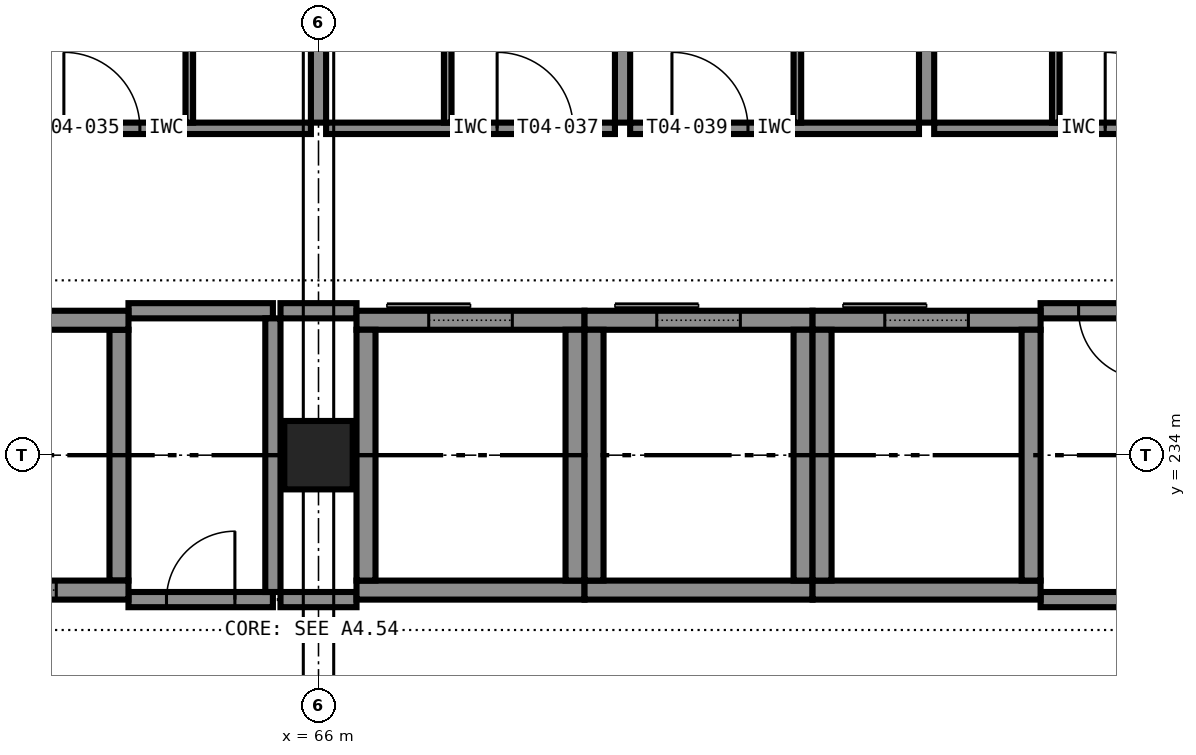
"""IFC4 building model, lengths in metres.
Left out: names, types, materials, properties, quantities, classifications, styles, units other than length and angle.
Written with IfcOpenShell. Run it as: python <this file> out.ifc"""

import sys

from ifc_helpers import new_model, si_unit, direction, frame, frame_2d, origin, origin_2d, place, context, subcontext, project, spatial, rectangle, extrude, element, fill, save


model = new_model("IFC4")
c1 = context("Model", 3, precision=1e-05, world=origin(), true_north=direction((0.0, 1.0)))
c2 = subcontext(c1, "Body", "Model", "MODEL_VIEW")
j1 = project(units=[si_unit("LENGTHUNIT", "METRE"), si_unit("PLANEANGLEUNIT", "RADIAN")], contexts=[c1])
p1 = place(None, origin())
s1 = spatial("IfcSite", under=j1, at=p1, CompositionType="ELEMENT")
p2 = place(p1, origin())
s2 = spatial("IfcBuilding", under=s1, at=p2, CompositionType="ELEMENT")
p3 = place(p2, frame((0.0, 0.0, 24.6)))
s3 = spatial("IfcBuildingStorey", under=s2, at=p3, CompositionType="ELEMENT", Elevation=24.6)
p4 = place(p3, frame((66.0, 234.0, 0.0), z_axis=(0.0, 0.0, 1.0), x_axis=(1.0, 0.0, 0.0)))
e1 = element("IfcColumn", 1, at=p4, inside=s3, PredefinedType="COLUMN", context=c2, shape_type="SweptSolid", body=[
    extrude(rectangle(XDim=0.9, YDim=0.9, at=origin_2d()), origin(), (0.0, 0.0, 1.0), 3.6),
])
p5 = place(p3, frame((60.5, 232.225, 0.0), z_axis=(0.0, 0.0, 1.0), x_axis=(1.0, 0.0, 0.0)))
e2 = element("IfcWall", 2, at=p5, inside=s3, PredefinedType="SHEAR", context=c2, shape_type="SweptSolid", body=[
    extrude(rectangle(XDim=3.0, YDim=0.25, at=frame_2d((1.5, 0.0))), origin(), (0.0, 0.0, 1.0), 3.6),
])
p6 = place(p5, frame((0.95, 0.0, 0.0)))
e3 = element("IfcOpeningElement", 3, at=p6, cuts=e2, PredefinedType="OPENING", context=c2, shape_type="SweptSolid", body=[
    extrude(rectangle(XDim=1.1, YDim=2.1, at=frame_2d((0.55, 1.05))), frame((0.0, 0.135, 0.0), z_axis=(0.0, -1.0, 0.0), x_axis=(1.0, 0.0, 0.0)), (0.0, 0.0, 1.0), 0.27),
])
p7 = place(p3, frame((60.5, 235.775, 0.0), z_axis=(0.0, 0.0, 1.0), x_axis=(1.0, 0.0, 0.0)))
e4 = element("IfcWall", 4, at=p7, inside=s3, PredefinedType="SHEAR", context=c2, shape_type="SweptSolid", body=[
    extrude(rectangle(XDim=3.0, YDim=0.25, at=frame_2d((1.5, 0.0))), origin(), (0.0, 0.0, 1.0), 3.6),
])
p8 = place(p3, frame((63.375, 232.35, 0.0), z_axis=(0.0, 0.0, 1.0), x_axis=(0.0, 1.0, 0.0)))
e5 = element("IfcWall", 5, at=p8, inside=s3, PredefinedType="SHEAR", context=c2, shape_type="SweptSolid", body=[
    extrude(rectangle(XDim=3.3, YDim=0.25, at=frame_2d((1.65, 0.0))), origin(), (0.0, 0.0, 1.0), 3.6),
])
p9 = place(p3, frame((66.5, 232.225, 0.0), z_axis=(0.0, 0.0, 1.0), x_axis=(1.0, 0.0, 0.0)))
e6 = element("IfcWall", 6, at=p9, inside=s3, PredefinedType="SHEAR", context=c2, shape_type="SweptSolid", body=[
    extrude(rectangle(XDim=3.0, YDim=0.25, at=frame_2d((1.5, 0.0))), origin(), (0.0, 0.0, 1.0), 3.6),
])
p10 = place(p3, frame((66.5, 235.775, 0.0), z_axis=(0.0, 0.0, 1.0), x_axis=(1.0, 0.0, 0.0)))
e7 = element("IfcWall", 7, at=p10, inside=s3, PredefinedType="SHEAR", context=c2, shape_type="SweptSolid", body=[
    extrude(rectangle(XDim=3.0, YDim=0.25, at=frame_2d((1.5, 0.0))), origin(), (0.0, 0.0, 1.0), 3.6),
])
p11 = place(p10, frame((0.95, 0.0, 0.0)))
e8 = element("IfcOpeningElement", 8, at=p11, cuts=e7, PredefinedType="OPENING", context=c2, shape_type="SweptSolid", body=[
    extrude(rectangle(XDim=1.1, YDim=2.1, at=frame_2d((0.55, 1.05))), frame((0.0, 0.135, 0.0), z_axis=(0.0, -1.0, 0.0), x_axis=(1.0, 0.0, 0.0)), (0.0, 0.0, 1.0), 0.27),
])
for number, where, z_axis, x_axis in (
    (9, (66.625, 232.35, 0.0), (0.0, 0.0, 1.0), (0.0, 1.0, 0.0)),
    (10, (69.375, 232.35, 0.0), (0.0, 0.0, 1.0), (0.0, 1.0, 0.0)),
):
    element("IfcWall", number, at=place(p3, frame(where, z_axis=z_axis, x_axis=x_axis)), inside=s3, PredefinedType="SHEAR", context=c2, shape_type="SweptSolid", body=[
        extrude(rectangle(XDim=3.3, YDim=0.25, at=frame_2d((1.65, 0.0))), origin(), (0.0, 0.0, 1.0), 3.6),
    ])
p12 = place(p3, frame((69.5, 232.225, 0.0), z_axis=(0.0, 0.0, 1.0), x_axis=(1.0, 0.0, 0.0)))
e11 = element("IfcWall", 11, at=p12, inside=s3, PredefinedType="SHEAR", context=c2, shape_type="SweptSolid", body=[
    extrude(rectangle(XDim=3.0, YDim=0.25, at=frame_2d((1.5, 0.0))), origin(), (0.0, 0.0, 1.0), 3.6),
])
p13 = place(p3, frame((69.5, 235.775, 0.0), z_axis=(0.0, 0.0, 1.0), x_axis=(1.0, 0.0, 0.0)))
e12 = element("IfcWall", 12, at=p13, inside=s3, PredefinedType="SHEAR", context=c2, shape_type="SweptSolid", body=[
    extrude(rectangle(XDim=3.0, YDim=0.25, at=frame_2d((1.5, 0.0))), origin(), (0.0, 0.0, 1.0), 3.6),
])
p14 = place(p13, frame((0.95, 0.0, 0.0)))
e13 = element("IfcOpeningElement", 13, at=p14, cuts=e12, PredefinedType="OPENING", context=c2, shape_type="SweptSolid", body=[
    extrude(rectangle(XDim=1.1, YDim=2.1, at=frame_2d((0.55, 1.05))), frame((0.0, 0.135, 0.0), z_axis=(0.0, -1.0, 0.0), x_axis=(1.0, 0.0, 0.0)), (0.0, 0.0, 1.0), 0.27),
])
for number, where, z_axis, x_axis in (
    (14, (69.625, 232.35, 0.0), (0.0, 0.0, 1.0), (0.0, 1.0, 0.0)),
    (15, (72.375, 232.35, 0.0), (0.0, 0.0, 1.0), (0.0, 1.0, 0.0)),
):
    element("IfcWall", number, at=place(p3, frame(where, z_axis=z_axis, x_axis=x_axis)), inside=s3, PredefinedType="SHEAR", context=c2, shape_type="SweptSolid", body=[
        extrude(rectangle(XDim=3.3, YDim=0.25, at=frame_2d((1.65, 0.0))), origin(), (0.0, 0.0, 1.0), 3.6),
    ])
p15 = place(p3, frame((72.5, 232.225, 0.0), z_axis=(0.0, 0.0, 1.0), x_axis=(1.0, 0.0, 0.0)))
e16 = element("IfcWall", 16, at=p15, inside=s3, PredefinedType="SHEAR", context=c2, shape_type="SweptSolid", body=[
    extrude(rectangle(XDim=3.0, YDim=0.25, at=frame_2d((1.5, 0.0))), origin(), (0.0, 0.0, 1.0), 3.6),
])
p16 = place(p3, frame((72.5, 235.775, 0.0), z_axis=(0.0, 0.0, 1.0), x_axis=(1.0, 0.0, 0.0)))
e17 = element("IfcWall", 17, at=p16, inside=s3, PredefinedType="SHEAR", context=c2, shape_type="SweptSolid", body=[
    extrude(rectangle(XDim=3.0, YDim=0.25, at=frame_2d((1.5, 0.0))), origin(), (0.0, 0.0, 1.0), 3.6),
])
p17 = place(p16, frame((0.95, 0.0, 0.0)))
e18 = element("IfcOpeningElement", 18, at=p17, cuts=e17, PredefinedType="OPENING", context=c2, shape_type="SweptSolid", body=[
    extrude(rectangle(XDim=1.1, YDim=2.1, at=frame_2d((0.55, 1.05))), frame((0.0, 0.135, 0.0), z_axis=(0.0, -1.0, 0.0), x_axis=(1.0, 0.0, 0.0)), (0.0, 0.0, 1.0), 0.27),
])
for number, where, z_axis, x_axis in (
    (19, (72.625, 232.35, 0.0), (0.0, 0.0, 1.0), (0.0, 1.0, 0.0)),
    (20, (75.375, 232.35, 0.0), (0.0, 0.0, 1.0), (0.0, 1.0, 0.0)),
):
    element("IfcWall", number, at=place(p3, frame(where, z_axis=z_axis, x_axis=x_axis)), inside=s3, PredefinedType="SHEAR", context=c2, shape_type="SweptSolid", body=[
        extrude(rectangle(XDim=3.3, YDim=0.25, at=frame_2d((1.65, 0.0))), origin(), (0.0, 0.0, 1.0), 3.6),
    ])
p18 = place(p3, frame((63.5, 232.1, 0.0), z_axis=(0.0, 0.0, 1.0), x_axis=(1.0, 0.0, 0.0)))
e21 = element("IfcWall", 21, at=p18, inside=s3, PredefinedType="PARTITIONING", context=c2, shape_type="SweptSolid", body=[
    extrude(rectangle(XDim=1.9, YDim=0.2, at=frame_2d((0.95, 0.0))), origin(), (0.0, 0.0, 1.0), 3.4),
])
p19 = place(p18, frame((0.5, 0.0, 0.0)))
e22 = element("IfcOpeningElement", 22, at=p19, cuts=e21, PredefinedType="OPENING", context=c2, shape_type="SweptSolid", body=[
    extrude(rectangle(XDim=0.9, YDim=2.1, at=frame_2d((0.45, 1.05))), frame((0.0, 0.11, 0.0), z_axis=(0.0, -1.0, 0.0), x_axis=(1.0, 0.0, 0.0)), (0.0, 0.0, 1.0), 0.22),
])
p20 = place(p3, frame((65.5, 232.1, 0.0), z_axis=(0.0, 0.0, 1.0), x_axis=(1.0, 0.0, 0.0)))
e23 = element("IfcWall", 23, at=p20, inside=s3, PredefinedType="PARTITIONING", context=c2, shape_type="SweptSolid", body=[
    extrude(rectangle(XDim=1.0, YDim=0.2, at=frame_2d((0.5, 0.0))), origin(), (0.0, 0.0, 1.0), 3.4),
])
for number, where, z_axis, x_axis in (
    (24, (75.5, 232.1, 0.0), (0.0, 0.0, 1.0), (1.0, 0.0, 0.0)),
    (25, (63.5, 235.9, 0.0), (0.0, 0.0, 1.0), (1.0, 0.0, 0.0)),
):
    element("IfcWall", number, at=place(p3, frame(where, z_axis=z_axis, x_axis=x_axis)), inside=s3, PredefinedType="PARTITIONING", context=c2, shape_type="SweptSolid", body=[
        extrude(rectangle(XDim=1.9, YDim=0.2, at=frame_2d((0.95, 0.0))), origin(), (0.0, 0.0, 1.0), 3.4),
    ])
p21 = place(p3, frame((65.5, 235.9, 0.0), z_axis=(0.0, 0.0, 1.0), x_axis=(1.0, 0.0, 0.0)))
e26 = element("IfcWall", 26, at=p21, inside=s3, PredefinedType="PARTITIONING", context=c2, shape_type="SweptSolid", body=[
    extrude(rectangle(XDim=1.0, YDim=0.2, at=frame_2d((0.5, 0.0))), origin(), (0.0, 0.0, 1.0), 3.4),
])
p22 = place(p3, frame((77.4, 235.9, 0.0), z_axis=(0.0, 0.0, 1.0), x_axis=(-1.0, 0.0, 0.0)))
e27 = element("IfcWall", 27, at=p22, inside=s3, PredefinedType="PARTITIONING", context=c2, shape_type="SweptSolid", body=[
    extrude(rectangle(XDim=1.9, YDim=0.2, at=frame_2d((0.95, 0.0))), origin(), (0.0, 0.0, 1.0), 3.4),
])
p23 = place(p22, frame((0.5, 0.0, 0.0)))
e28 = element("IfcOpeningElement", 28, at=p23, cuts=e27, PredefinedType="OPENING", context=c2, shape_type="SweptSolid", body=[
    extrude(rectangle(XDim=0.9, YDim=2.1, at=frame_2d((0.45, 1.05))), frame((0.0, 0.11, 0.0), z_axis=(0.0, -1.0, 0.0), x_axis=(1.0, 0.0, 0.0)), (0.0, 0.0, 1.0), 0.22),
])
p24 = place(p3, frame((65.4, 232.2, 0.0), z_axis=(0.0, 0.0, 1.0), x_axis=(0.0, 1.0, 0.0)))
e29 = element("IfcWall", 29, at=p24, inside=s3, PredefinedType="PARTITIONING", context=c2, shape_type="SweptSolid", body=[
    extrude(rectangle(XDim=3.6, YDim=0.2, at=frame_2d((1.8, 0.0))), origin(), (0.0, 0.0, 1.0), 3.4),
])
p25 = place(p3, frame((62.1, 238.3, 0.0), z_axis=(0.0, 0.0, 1.0), x_axis=(1.0, 0.0, 0.0)))
e30 = element("IfcWall", 30, at=p25, inside=s3, PredefinedType="PARTITIONING", context=c2, shape_type="SweptSolid", body=[
    extrude(rectangle(XDim=3.8, YDim=0.15, at=frame_2d((1.9, 0.0))), origin(), (0.0, 0.0, 1.0), 3.4),
])
p26 = place(p25, frame((0.55, 0.0, 0.0)))
e31 = element("IfcOpeningElement", 31, at=p26, cuts=e30, PredefinedType="OPENING", context=c2, shape_type="SweptSolid", body=[
    extrude(rectangle(XDim=1.0, YDim=2.1, at=frame_2d((0.5, 1.05))), frame((0.0, 0.085, 0.0), z_axis=(0.0, -1.0, 0.0), x_axis=(1.0, 0.0, 0.0)), (0.0, 0.0, 1.0), 0.17),
])
p27 = place(p3, frame((64.3, 238.375, 0.0), z_axis=(0.0, 0.0, 1.0), x_axis=(0.0, 1.0, 0.0)))
e32 = element("IfcWall", 32, at=p27, inside=s3, PredefinedType="PARTITIONING", context=c2, shape_type="SweptSolid", body=[
    extrude(rectangle(XDim=2.875, YDim=0.1, at=frame_2d((1.438, 0.0))), origin(), (0.0, 0.0, 1.0), 3.4),
])
p28 = place(p27, frame((1.038, 0.0, 0.0)))
e33 = element("IfcOpeningElement", 33, at=p28, cuts=e32, PredefinedType="OPENING", context=c2, shape_type="SweptSolid", body=[
    extrude(rectangle(XDim=0.8, YDim=2.1, at=frame_2d((0.4, 1.05))), frame((0.0, 0.06, 0.0), z_axis=(0.0, -1.0, 0.0), x_axis=(1.0, 0.0, 0.0)), (0.0, 0.0, 1.0), 0.12),
])
p29 = place(p3, frame((66.1, 238.3, 0.0), z_axis=(0.0, 0.0, 1.0), x_axis=(1.0, 0.0, 0.0)))
e34 = element("IfcWall", 34, at=p29, inside=s3, PredefinedType="PARTITIONING", context=c2, shape_type="SweptSolid", body=[
    extrude(rectangle(XDim=3.8, YDim=0.15, at=frame_2d((1.9, 0.0))), origin(), (0.0, 0.0, 1.0), 3.4),
])
p30 = place(p29, frame((2.25, 0.0, 0.0)))
e35 = element("IfcOpeningElement", 35, at=p30, cuts=e34, PredefinedType="OPENING", context=c2, shape_type="SweptSolid", body=[
    extrude(rectangle(XDim=1.0, YDim=2.1, at=frame_2d((0.5, 1.05))), frame((0.0, 0.085, 0.0), z_axis=(0.0, -1.0, 0.0), x_axis=(1.0, 0.0, 0.0)), (0.0, 0.0, 1.0), 0.17),
])
p31 = place(p3, frame((67.7, 241.25, 0.0), z_axis=(0.0, 0.0, 1.0), x_axis=(0.0, -1.0, 0.0)))
e36 = element("IfcWall", 36, at=p31, inside=s3, PredefinedType="PARTITIONING", context=c2, shape_type="SweptSolid", body=[
    extrude(rectangle(XDim=2.875, YDim=0.1, at=frame_2d((1.438, 0.0))), origin(), (0.0, 0.0, 1.0), 3.4),
])
p32 = place(p31, frame((1.038, 0.0, 0.0)))
e37 = element("IfcOpeningElement", 37, at=p32, cuts=e36, PredefinedType="OPENING", context=c2, shape_type="SweptSolid", body=[
    extrude(rectangle(XDim=0.8, YDim=2.1, at=frame_2d((0.4, 1.05))), frame((0.0, 0.06, 0.0), z_axis=(0.0, -1.0, 0.0), x_axis=(1.0, 0.0, 0.0)), (0.0, 0.0, 1.0), 0.12),
])
p33 = place(p3, frame((70.1, 238.3, 0.0), z_axis=(0.0, 0.0, 1.0), x_axis=(1.0, 0.0, 0.0)))
e38 = element("IfcWall", 38, at=p33, inside=s3, PredefinedType="PARTITIONING", context=c2, shape_type="SweptSolid", body=[
    extrude(rectangle(XDim=3.8, YDim=0.15, at=frame_2d((1.9, 0.0))), origin(), (0.0, 0.0, 1.0), 3.4),
])
p34 = place(p33, frame((0.55, 0.0, 0.0)))
e39 = element("IfcOpeningElement", 39, at=p34, cuts=e38, PredefinedType="OPENING", context=c2, shape_type="SweptSolid", body=[
    extrude(rectangle(XDim=1.0, YDim=2.1, at=frame_2d((0.5, 1.05))), frame((0.0, 0.085, 0.0), z_axis=(0.0, -1.0, 0.0), x_axis=(1.0, 0.0, 0.0)), (0.0, 0.0, 1.0), 0.17),
])
p35 = place(p3, frame((72.3, 238.375, 0.0), z_axis=(0.0, 0.0, 1.0), x_axis=(0.0, 1.0, 0.0)))
e40 = element("IfcWall", 40, at=p35, inside=s3, PredefinedType="PARTITIONING", context=c2, shape_type="SweptSolid", body=[
    extrude(rectangle(XDim=2.875, YDim=0.1, at=frame_2d((1.438, 0.0))), origin(), (0.0, 0.0, 1.0), 3.4),
])
p36 = place(p35, frame((1.038, 0.0, 0.0)))
e41 = element("IfcOpeningElement", 41, at=p36, cuts=e40, PredefinedType="OPENING", context=c2, shape_type="SweptSolid", body=[
    extrude(rectangle(XDim=0.8, YDim=2.1, at=frame_2d((0.4, 1.05))), frame((0.0, 0.06, 0.0), z_axis=(0.0, -1.0, 0.0), x_axis=(1.0, 0.0, 0.0)), (0.0, 0.0, 1.0), 0.12),
])
p37 = place(p3, frame((74.1, 238.3, 0.0), z_axis=(0.0, 0.0, 1.0), x_axis=(1.0, 0.0, 0.0)))
e42 = element("IfcWall", 42, at=p37, inside=s3, PredefinedType="PARTITIONING", context=c2, shape_type="SweptSolid", body=[
    extrude(rectangle(XDim=3.8, YDim=0.15, at=frame_2d((1.9, 0.0))), origin(), (0.0, 0.0, 1.0), 3.4),
])
p38 = place(p37, frame((2.25, 0.0, 0.0)))
e43 = element("IfcOpeningElement", 43, at=p38, cuts=e42, PredefinedType="OPENING", context=c2, shape_type="SweptSolid", body=[
    extrude(rectangle(XDim=1.0, YDim=2.1, at=frame_2d((0.5, 1.05))), frame((0.0, 0.085, 0.0), z_axis=(0.0, -1.0, 0.0), x_axis=(1.0, 0.0, 0.0)), (0.0, 0.0, 1.0), 0.17),
])
p39 = place(p3, frame((75.7, 241.25, 0.0), z_axis=(0.0, 0.0, 1.0), x_axis=(0.0, -1.0, 0.0)))
e44 = element("IfcWall", 44, at=p39, inside=s3, PredefinedType="PARTITIONING", context=c2, shape_type="SweptSolid", body=[
    extrude(rectangle(XDim=2.875, YDim=0.1, at=frame_2d((1.438, 0.0))), origin(), (0.0, 0.0, 1.0), 3.4),
])
p40 = place(p39, frame((1.038, 0.0, 0.0)))
e45 = element("IfcOpeningElement", 45, at=p40, cuts=e44, PredefinedType="OPENING", context=c2, shape_type="SweptSolid", body=[
    extrude(rectangle(XDim=0.8, YDim=2.1, at=frame_2d((0.4, 1.05))), frame((0.0, 0.06, 0.0), z_axis=(0.0, -1.0, 0.0), x_axis=(1.0, 0.0, 0.0)), (0.0, 0.0, 1.0), 0.12),
])
p41 = place(p3, frame((66.0, 245.55, 0.0), z_axis=(0.0, 0.0, 1.0), x_axis=(0.0, -1.0, 0.0)))
e46 = element("IfcWall", 46, at=p41, inside=s3, PredefinedType="PARTITIONING", context=c2, shape_type="SweptSolid", body=[
    extrude(rectangle(XDim=7.175, YDim=0.2, at=frame_2d((3.587, 0.0))), origin(), (0.0, 0.0, 1.0), 2.6),
])
for number, where, z_axis, x_axis in (
    (47, (70.0, 245.7, 0.0), (0.0, 0.0, 1.0), (0.0, -1.0, 0.0)),
    (48, (74.0, 245.7, 0.0), (0.0, 0.0, 1.0), (0.0, -1.0, 0.0)),
):
    element("IfcWall", number, at=place(p3, frame(where, z_axis=z_axis, x_axis=x_axis)), inside=s3, PredefinedType="PARTITIONING", context=c2, shape_type="SweptSolid", body=[
        extrude(rectangle(XDim=7.325, YDim=0.2, at=frame_2d((3.663, 0.0))), origin(), (0.0, 0.0, 1.0), 3.4),
    ])
p42 = place(p19, origin())
e49 = element("IfcDoor", 49, at=p42, inside=s3, OperationType="SINGLE_SWING_RIGHT", PredefinedType="DOOR", context=c2, shape_type="SweptSolid", body=[
    extrude(rectangle(XDim=0.9, YDim=2.1, at=frame_2d((0.45, 1.05))), frame((0.0, 0.025, 0.0), z_axis=(0.0, -1.0, 0.0), x_axis=(1.0, 0.0, 0.0)), (0.0, 0.0, 1.0), 0.05),
])
fill(e22, e49)
p43 = place(p23, origin())
e50 = element("IfcDoor", 50, at=p43, inside=s3, OperationType="SINGLE_SWING_LEFT", PredefinedType="DOOR", context=c2, shape_type="SweptSolid", body=[
    extrude(rectangle(XDim=0.9, YDim=2.1, at=frame_2d((0.45, 1.05))), frame((0.0, 0.025, 0.0), z_axis=(0.0, -1.0, 0.0), x_axis=(1.0, 0.0, 0.0)), (0.0, 0.0, 1.0), 0.05),
])
fill(e28, e50)
p44 = place(p26, origin())
e51 = element("IfcDoor", 51, at=p44, inside=s3, OperationType="SINGLE_SWING_LEFT", PredefinedType="DOOR", context=c2, shape_type="SweptSolid", body=[
    extrude(rectangle(XDim=1.0, YDim=2.1, at=frame_2d((0.5, 1.05))), frame((0.0, 0.025, 0.0), z_axis=(0.0, -1.0, 0.0), x_axis=(1.0, 0.0, 0.0)), (0.0, 0.0, 1.0), 0.05),
])
fill(e31, e51)
p45 = place(p30, origin())
e52 = element("IfcDoor", 52, at=p45, inside=s3, OperationType="SINGLE_SWING_LEFT", PredefinedType="DOOR", context=c2, shape_type="SweptSolid", body=[
    extrude(rectangle(XDim=1.0, YDim=2.1, at=frame_2d((0.5, 1.05))), frame((0.0, 0.025, 0.0), z_axis=(0.0, -1.0, 0.0), x_axis=(1.0, 0.0, 0.0)), (0.0, 0.0, 1.0), 0.05),
])
fill(e35, e52)
p46 = place(p34, origin())
e53 = element("IfcDoor", 53, at=p46, inside=s3, OperationType="SINGLE_SWING_LEFT", PredefinedType="DOOR", context=c2, shape_type="SweptSolid", body=[
    extrude(rectangle(XDim=1.0, YDim=2.1, at=frame_2d((0.5, 1.05))), frame((0.0, 0.025, 0.0), z_axis=(0.0, -1.0, 0.0), x_axis=(1.0, 0.0, 0.0)), (0.0, 0.0, 1.0), 0.05),
])
fill(e39, e53)
p47 = place(p38, origin())
e54 = element("IfcDoor", 54, at=p47, inside=s3, OperationType="SINGLE_SWING_LEFT", PredefinedType="DOOR", context=c2, shape_type="SweptSolid", body=[
    extrude(rectangle(XDim=1.0, YDim=2.1, at=frame_2d((0.5, 1.05))), frame((0.0, 0.025, 0.0), z_axis=(0.0, -1.0, 0.0), x_axis=(1.0, 0.0, 0.0)), (0.0, 0.0, 1.0), 0.05),
])
fill(e43, e54)
p48 = place(p6, origin())
e55 = element("IfcDoor", 55, at=p48, inside=s3, OperationType="SLIDING_TO_LEFT", PredefinedType="DOOR", context=c2, shape_type="SweptSolid", body=[
    extrude(rectangle(XDim=1.1, YDim=2.1, at=frame_2d((0.55, 1.05))), frame((0.0, 0.025, 0.0), z_axis=(0.0, -1.0, 0.0), x_axis=(1.0, 0.0, 0.0)), (0.0, 0.0, 1.0), 0.05),
])
fill(e3, e55)
p49 = place(p11, origin())
e56 = element("IfcDoor", 56, at=p49, inside=s3, OperationType="SLIDING_TO_LEFT", PredefinedType="DOOR", context=c2, shape_type="SweptSolid", body=[
    extrude(rectangle(XDim=1.1, YDim=2.1, at=frame_2d((0.55, 1.05))), frame((0.0, 0.025, 0.0), z_axis=(0.0, -1.0, 0.0), x_axis=(1.0, 0.0, 0.0)), (0.0, 0.0, 1.0), 0.05),
])
fill(e8, e56)
p50 = place(p14, origin())
e57 = element("IfcDoor", 57, at=p50, inside=s3, OperationType="SLIDING_TO_LEFT", PredefinedType="DOOR", context=c2, shape_type="SweptSolid", body=[
    extrude(rectangle(XDim=1.1, YDim=2.1, at=frame_2d((0.55, 1.05))), frame((0.0, 0.025, 0.0), z_axis=(0.0, -1.0, 0.0), x_axis=(1.0, 0.0, 0.0)), (0.0, 0.0, 1.0), 0.05),
])
fill(e13, e57)
p51 = place(p17, origin())
e58 = element("IfcDoor", 58, at=p51, inside=s3, OperationType="SLIDING_TO_LEFT", PredefinedType="DOOR", context=c2, shape_type="SweptSolid", body=[
    extrude(rectangle(XDim=1.1, YDim=2.1, at=frame_2d((0.55, 1.05))), frame((0.0, 0.025, 0.0), z_axis=(0.0, -1.0, 0.0), x_axis=(1.0, 0.0, 0.0)), (0.0, 0.0, 1.0), 0.05),
])
fill(e18, e58)
save(model, sys.argv[1])
